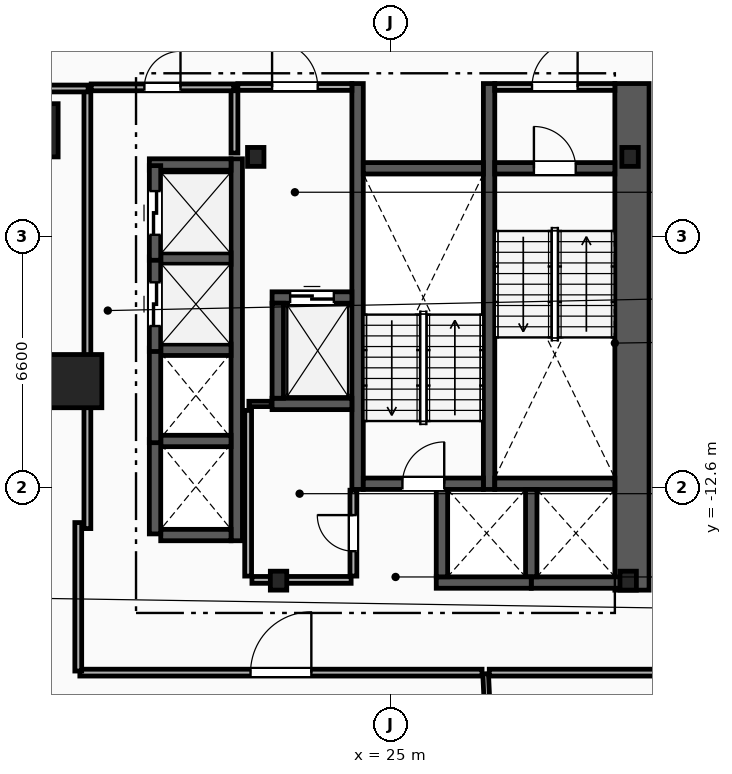
"""IFC4 building model, lengths in metres.
Left out: names, types, materials, properties, quantities, classifications, styles, units other than length and angle.
Written with IfcOpenShell. Run it as: python <this file> out.ifc"""

import sys

from ifc_helpers import new_model, si_unit, direction, frame, frame_2d, origin, origin_2d, place, context, subcontext, project, spatial, rectangle, i_section, extrude, element, fill, save


model = new_model("IFC4")
c1 = context("Model", 3, precision=1e-05, world=origin(), true_north=direction((0.0, 1.0)))
c2 = subcontext(c1, "Body", "Model", "MODEL_VIEW")
j1 = project(units=[si_unit("LENGTHUNIT", "METRE"), si_unit("PLANEANGLEUNIT", "RADIAN")], contexts=[c1])
p1 = place(None, origin())
s1 = spatial("IfcSite", under=j1, at=p1, CompositionType="ELEMENT")
p2 = place(p1, origin())
s2 = spatial("IfcBuilding", under=s1, at=p2, CompositionType="ELEMENT")
p3 = place(p2, frame((0.0, 0.0, 12.0)))
s3 = spatial("IfcBuildingStorey", under=s2, at=p3, CompositionType="ELEMENT", Elevation=12.0)
for number, where, z_axis, x_axis in (
    (1, (31.3, -3.9, 0.0), (0.0, 0.0, 1.0), (1.0, 0.0, 0.0)),
    (2, (21.45, -3.9, 0.0), (0.0, 0.0, 1.0), (1.0, 0.0, 0.0)),
    (3, (22.05, -15.05, 0.0), (0.0, 0.0, 1.0), (1.0, 0.0, 0.0)),
    (4, (31.25, -15.05, 0.0), (0.0, 0.0, 1.0), (1.0, 0.0, 0.0)),
):
    element("IfcColumn", number, at=place(p3, frame(where, z_axis=z_axis, x_axis=x_axis)), inside=s3, PredefinedType="COLUMN", context=c2, shape_type="SweptSolid", body=[
        extrude(i_section(OverallWidth=0.432, OverallDepth=0.498, WebThickness=0.056, FlangeThickness=0.089, FilletRadius=0.018, at=origin_2d()), origin(), (0.0, 0.0, 1.0), 4.0),
    ])
for number, where, z_axis, x_axis in (
    (5, (15.55, -3.2, 0.0), (0.0, 0.0, 1.0), (1.0, 0.0, 0.0)),
    (6, (16.7, -9.8, 0.0), (0.0, 0.0, 1.0), (1.0, 0.0, 0.0)),
):
    element("IfcColumn", number, at=place(p3, frame(where, z_axis=z_axis, x_axis=x_axis)), inside=s3, PredefinedType="COLUMN", context=c2, shape_type="SweptSolid", body=[
        extrude(rectangle(XDim=1.4, YDim=1.4, at=origin_2d()), origin(), (0.0, 0.0, 1.0), 4.0),
    ])
p4 = place(p3, frame((31.35, -15.3, 0.0), z_axis=(0.0, 0.0, 1.0), x_axis=(0.0, 1.0, 0.0)))
e7 = element("IfcWall", 7, at=p4, inside=s3, PredefinedType="SHEAR", context=c2, shape_type="SweptSolid", body=[
    extrude(rectangle(XDim=13.33, YDim=0.9, at=frame_2d((6.665, 0.0))), origin(), (0.0, 0.0, 1.0), 3.65),
])
for number, where, z_axis, x_axis in (
    (8, (27.59, -12.65, 0.0), (0.0, 0.0, 1.0), (0.0, 1.0, 0.0)),
    (9, (24.13, -12.65, 0.0), (0.0, 0.0, 1.0), (0.0, 1.0, 0.0)),
):
    element("IfcWall", number, at=place(p3, frame(where, z_axis=z_axis, x_axis=x_axis)), inside=s3, PredefinedType="SHEAR", context=c2, shape_type="SweptSolid", body=[
        extrude(rectangle(XDim=10.68, YDim=0.3, at=frame_2d((5.34, 0.0))), origin(), (0.0, 0.0, 1.0), 3.65),
    ])
p5 = place(p3, frame((27.74, -4.2, 0.0), z_axis=(0.0, 0.0, 1.0), x_axis=(1.0, 0.0, 0.0)))
e10 = element("IfcWall", 10, at=p5, inside=s3, PredefinedType="SHEAR", context=c2, shape_type="SweptSolid", body=[
    extrude(rectangle(XDim=3.16, YDim=0.3, at=frame_2d((1.58, 0.0))), origin(), (0.0, 0.0, 1.0), 3.65),
])
p6 = place(p5, frame((1.03, 0.0, 0.0)))
e11 = element("IfcOpeningElement", 11, at=p6, cuts=e10, PredefinedType="OPENING", context=c2, shape_type="SweptSolid", body=[
    extrude(rectangle(XDim=1.1, YDim=2.15, at=frame_2d((0.55, 1.075))), frame((0.0, 0.16, 0.0), z_axis=(0.0, -1.0, 0.0), x_axis=(1.0, 0.0, 0.0)), (0.0, 0.0, 1.0), 0.32),
])
p7 = place(p3, frame((27.74, -12.5, 0.0), z_axis=(0.0, 0.0, 1.0), x_axis=(1.0, 0.0, 0.0)))
e12 = element("IfcWall", 12, at=p7, inside=s3, PredefinedType="SHEAR", context=c2, shape_type="SweptSolid", body=[
    extrude(rectangle(XDim=3.16, YDim=0.3, at=frame_2d((1.58, 0.0))), origin(), (0.0, 0.0, 1.0), 3.65),
])
p8 = place(p3, frame((24.28, -12.5, 0.0), z_axis=(0.0, 0.0, 1.0), x_axis=(1.0, 0.0, 0.0)))
e13 = element("IfcWall", 13, at=p8, inside=s3, PredefinedType="SHEAR", context=c2, shape_type="SweptSolid", body=[
    extrude(rectangle(XDim=3.16, YDim=0.3, at=frame_2d((1.58, 0.0))), origin(), (0.0, 0.0, 1.0), 3.65),
])
p9 = place(p8, frame((1.03, 0.0, 0.0)))
e14 = element("IfcOpeningElement", 14, at=p9, cuts=e13, PredefinedType="OPENING", context=c2, shape_type="SweptSolid", body=[
    extrude(rectangle(XDim=1.1, YDim=2.15, at=frame_2d((0.55, 1.075))), frame((0.0, 0.16, 0.0), z_axis=(0.0, -1.0, 0.0), x_axis=(1.0, 0.0, 0.0)), (0.0, 0.0, 1.0), 0.32),
])
p10 = place(p3, frame((24.28, -4.2, 0.0), z_axis=(0.0, 0.0, 1.0), x_axis=(1.0, 0.0, 0.0)))
e15 = element("IfcWall", 15, at=p10, inside=s3, PredefinedType="SHEAR", context=c2, shape_type="SweptSolid", body=[
    extrude(rectangle(XDim=3.16, YDim=0.3, at=frame_2d((1.58, 0.0))), origin(), (0.0, 0.0, 1.0), 3.65),
])
p11 = place(p3, frame((20.89, -3.8, 0.0), z_axis=(0.0, 0.0, 1.0), x_axis=(0.0, 1.0, 0.0)))
e16 = element("IfcWall", 16, at=p11, inside=s3, PredefinedType="PARTITIONING", context=c2, shape_type="SweptSolid", body=[
    extrude(rectangle(XDim=1.65, YDim=0.18, at=frame_2d((0.825, 0.0))), origin(), (0.0, 0.0, 1.0), 3.65),
])
p12 = place(p3, frame((20.98, -2.06, 0.0), z_axis=(0.0, 0.0, 1.0), x_axis=(1.0, 0.0, 0.0)))
e17 = element("IfcWall", 17, at=p12, inside=s3, PredefinedType="PARTITIONING", context=c2, shape_type="SweptSolid", body=[
    extrude(rectangle(XDim=3.0, YDim=0.18, at=frame_2d((1.5, 0.0))), origin(), (0.0, 0.0, 1.0), 3.65),
])
p13 = place(p12, frame((0.9, 0.0, 0.0)))
e18 = element("IfcOpeningElement", 18, at=p13, cuts=e17, PredefinedType="OPENING", context=c2, shape_type="SweptSolid", body=[
    extrude(rectangle(XDim=1.2, YDim=2.15, at=frame_2d((0.6, 1.075))), frame((0.0, 0.1, 0.0), z_axis=(0.0, -1.0, 0.0), x_axis=(1.0, 0.0, 0.0)), (0.0, 0.0, 1.0), 0.2),
])
p14 = place(p3, frame((27.74, -2.06, 0.0), z_axis=(0.0, 0.0, 1.0), x_axis=(1.0, 0.0, 0.0)))
e19 = element("IfcWall", 19, at=p14, inside=s3, PredefinedType="PARTITIONING", context=c2, shape_type="SweptSolid", body=[
    extrude(rectangle(XDim=3.16, YDim=0.18, at=frame_2d((1.58, 0.0))), origin(), (0.0, 0.0, 1.0), 3.65),
])
p15 = place(p14, frame((0.98, 0.0, 0.0)))
e20 = element("IfcOpeningElement", 20, at=p15, cuts=e19, PredefinedType="OPENING", context=c2, shape_type="SweptSolid", body=[
    extrude(rectangle(XDim=1.2, YDim=2.15, at=frame_2d((0.6, 1.075))), frame((0.0, 0.1, 0.0), z_axis=(0.0, -1.0, 0.0), x_axis=(1.0, 0.0, 0.0)), (0.0, 0.0, 1.0), 0.2),
])
p16 = place(p3, frame((21.88, -7.6, 0.0), z_axis=(0.0, 0.0, 1.0), x_axis=(1.0, 0.0, 0.0)))
e21 = element("IfcWall", 21, at=p16, inside=s3, PredefinedType="SHEAR", context=c2, shape_type="SweptSolid", body=[
    extrude(rectangle(XDim=2.1, YDim=0.3, at=frame_2d((1.05, 0.0))), origin(), (0.0, 0.0, 1.0), 3.65),
])
p17 = place(p16, frame((0.475, 0.0, 0.0)))
e22 = element("IfcOpeningElement", 22, at=p17, cuts=e21, PredefinedType="OPENING", context=c2, shape_type="SweptSolid", body=[
    extrude(rectangle(XDim=1.15, YDim=2.2, at=frame_2d((0.575, 1.1))), frame((0.0, 0.16, 0.0), z_axis=(0.0, -1.0, 0.0), x_axis=(1.0, 0.0, 0.0)), (0.0, 0.0, 1.0), 0.32),
])
p18 = place(p3, frame((21.88, -10.4, 0.0), z_axis=(0.0, 0.0, 1.0), x_axis=(1.0, 0.0, 0.0)))
e23 = element("IfcWall", 23, at=p18, inside=s3, PredefinedType="SHEAR", context=c2, shape_type="SweptSolid", body=[
    extrude(rectangle(XDim=2.1, YDim=0.3, at=frame_2d((1.05, 0.0))), origin(), (0.0, 0.0, 1.0), 3.65),
])
for number, where, z_axis, x_axis in (
    (24, (22.03, -10.25, 0.0), (0.0, 0.0, 1.0), (0.0, 1.0, 0.0)),
    (25, (28.7, -15.1, 0.0), (0.0, 0.0, 1.0), (1.0, 0.0, 0.0)),
):
    element("IfcWall", number, at=place(p3, frame(where, z_axis=z_axis, x_axis=x_axis)), inside=s3, PredefinedType="SHEAR", context=c2, shape_type="SweptSolid", body=[
        extrude(rectangle(XDim=2.5, YDim=0.3, at=frame_2d((1.25, 0.0))), origin(), (0.0, 0.0, 1.0), 3.65),
    ])
p19 = place(p3, frame((28.7, -14.95, 0.0), z_axis=(0.0, 0.0, 1.0), x_axis=(0.0, 1.0, 0.0)))
e26 = element("IfcWall", 26, at=p19, inside=s3, PredefinedType="SHEAR", context=c2, shape_type="SweptSolid", body=[
    extrude(rectangle(XDim=2.3, YDim=0.3, at=frame_2d((1.15, 0.0))), origin(), (0.0, 0.0, 1.0), 3.65),
])
p20 = place(p3, frame((26.2, -15.1, 0.0), z_axis=(0.0, 0.0, 1.0), x_axis=(1.0, 0.0, 0.0)))
e27 = element("IfcWall", 27, at=p20, inside=s3, PredefinedType="SHEAR", context=c2, shape_type="SweptSolid", body=[
    extrude(rectangle(XDim=2.5, YDim=0.3, at=frame_2d((1.25, 0.0))), origin(), (0.0, 0.0, 1.0), 3.65),
])
p21 = place(p3, frame((26.35, -14.95, 0.0), z_axis=(0.0, 0.0, 1.0), x_axis=(0.0, 1.0, 0.0)))
e28 = element("IfcWall", 28, at=p21, inside=s3, PredefinedType="SHEAR", context=c2, shape_type="SweptSolid", body=[
    extrude(rectangle(XDim=2.3, YDim=0.3, at=frame_2d((1.15, 0.0))), origin(), (0.0, 0.0, 1.0), 3.65),
])
p22 = place(p3, frame((20.95, -14.0, 0.0), z_axis=(0.0, 0.0, 1.0), x_axis=(0.0, 1.0, 0.0)))
e29 = element("IfcWall", 29, at=p22, inside=s3, PredefinedType="SHEAR", context=c2, shape_type="SweptSolid", body=[
    extrude(rectangle(XDim=10.05, YDim=0.3, at=frame_2d((5.025, 0.0))), origin(), (0.0, 0.0, 1.0), 3.65),
])
p23 = place(p3, frame((18.95, -13.85, 0.0), z_axis=(0.0, 0.0, 1.0), x_axis=(1.0, 0.0, 0.0)))
e30 = element("IfcWall", 30, at=p23, inside=s3, PredefinedType="SHEAR", context=c2, shape_type="SweptSolid", body=[
    extrude(rectangle(XDim=1.85, YDim=0.3, at=frame_2d((0.925, 0.0))), origin(), (0.0, 0.0, 1.0), 3.65),
])
p24 = place(p3, frame((18.65, -4.1, 0.0), z_axis=(0.0, 0.0, 1.0), x_axis=(1.0, 0.0, 0.0)))
e31 = element("IfcWall", 31, at=p24, inside=s3, PredefinedType="SHEAR", context=c2, shape_type="SweptSolid", body=[
    extrude(rectangle(XDim=2.15, YDim=0.3, at=frame_2d((1.075, 0.0))), origin(), (0.0, 0.0, 1.0), 3.65),
])
for number, where, z_axis, x_axis in (
    (32, (18.95, -11.375, 0.0), (0.0, 0.0, 1.0), (1.0, 0.0, 0.0)),
    (33, (18.95, -8.975, 0.0), (0.0, 0.0, 1.0), (1.0, 0.0, 0.0)),
    (34, (18.95, -6.575, 0.0), (0.0, 0.0, 1.0), (1.0, 0.0, 0.0)),
):
    element("IfcWall", number, at=place(p3, frame(where, z_axis=z_axis, x_axis=x_axis)), inside=s3, PredefinedType="SHEAR", context=c2, shape_type="SweptSolid", body=[
        extrude(rectangle(XDim=1.85, YDim=0.3, at=frame_2d((0.925, 0.0))), origin(), (0.0, 0.0, 1.0), 3.65),
    ])
for number, where, z_axis, x_axis in (
    (35, (18.8, -13.82, 0.0), (0.0, 0.0, 1.0), (0.0, 1.0, 0.0)),
    (36, (18.8, -11.42, 0.0), (0.0, 0.0, 1.0), (0.0, 1.0, 0.0)),
):
    element("IfcWall", number, at=place(p3, frame(where, z_axis=z_axis, x_axis=x_axis)), inside=s3, PredefinedType="SHEAR", context=c2, shape_type="SweptSolid", body=[
        extrude(rectangle(XDim=2.49, YDim=0.3, at=frame_2d((1.245, 0.0))), origin(), (0.0, 0.0, 1.0), 3.65),
    ])
p25 = place(p3, frame((18.8, -9.02, 0.0), z_axis=(0.0, 0.0, 1.0), x_axis=(0.0, 1.0, 0.0)))
e37 = element("IfcWall", 37, at=p25, inside=s3, PredefinedType="SHEAR", context=c2, shape_type="SweptSolid", body=[
    extrude(rectangle(XDim=2.49, YDim=0.3, at=frame_2d((1.245, 0.0))), origin(), (0.0, 0.0, 1.0), 3.65),
])
p26 = place(p25, frame((0.67, 0.0, 0.0)))
e38 = element("IfcOpeningElement", 38, at=p26, cuts=e37, PredefinedType="OPENING", context=c2, shape_type="SweptSolid", body=[
    extrude(rectangle(XDim=1.15, YDim=2.2, at=frame_2d((0.575, 1.1))), frame((0.0, 0.16, 0.0), z_axis=(0.0, -1.0, 0.0), x_axis=(1.0, 0.0, 0.0)), (0.0, 0.0, 1.0), 0.32),
])
p27 = place(p3, frame((18.8, -6.62, 0.0), z_axis=(0.0, 0.0, 1.0), x_axis=(0.0, 1.0, 0.0)))
e39 = element("IfcWall", 39, at=p27, inside=s3, PredefinedType="SHEAR", context=c2, shape_type="SweptSolid", body=[
    extrude(rectangle(XDim=2.49, YDim=0.3, at=frame_2d((1.245, 0.0))), origin(), (0.0, 0.0, 1.0), 3.65),
])
p28 = place(p27, frame((0.67, 0.0, 0.0)))
e40 = element("IfcOpeningElement", 40, at=p28, cuts=e39, PredefinedType="OPENING", context=c2, shape_type="SweptSolid", body=[
    extrude(rectangle(XDim=1.15, YDim=2.2, at=frame_2d((0.575, 1.1))), frame((0.0, 0.16, 0.0), z_axis=(0.0, -1.0, 0.0), x_axis=(1.0, 0.0, 0.0)), (0.0, 0.0, 1.0), 0.32),
])
p29 = place(p3, frame((17.02, -13.68, 0.0), z_axis=(0.0, 0.0, 1.0), x_axis=(0.0, 1.0, 0.0)))
e41 = element("IfcWall", 41, at=p29, inside=s3, PredefinedType="PARTITIONING", context=c2, shape_type="SweptSolid", body=[
    extrude(rectangle(XDim=11.51, YDim=0.18, at=frame_2d((5.755, 0.0))), origin(), (0.0, 0.0, 1.0), 3.65),
])
p30 = place(p3, frame((17.12, -2.07, 0.0), z_axis=(0.0, 0.0, 1.0), x_axis=(1.0, 0.0, 0.0)))
e42 = element("IfcWall", 42, at=p30, inside=s3, PredefinedType="PARTITIONING", context=c2, shape_type="SweptSolid", body=[
    extrude(rectangle(XDim=3.75, YDim=0.18, at=frame_2d((1.875, 0.0))), origin(), (0.0, 0.0, 1.0), 3.65),
])
p31 = place(p30, frame((1.4, 0.0, 0.0)))
e43 = element("IfcOpeningElement", 43, at=p31, cuts=e42, PredefinedType="OPENING", context=c2, shape_type="SweptSolid", body=[
    extrude(rectangle(XDim=0.95, YDim=2.1, at=frame_2d((0.475, 1.05))), frame((0.0, 0.1, 0.0), z_axis=(0.0, -1.0, 0.0), x_axis=(1.0, 0.0, 0.0)), (0.0, 0.0, 1.0), 0.2),
])
p32 = place(p3, frame((21.27, -10.4, 0.0), z_axis=(0.0, 0.0, 1.0), x_axis=(1.0, 0.0, 0.0)))
e44 = element("IfcWall", 44, at=p32, inside=s3, PredefinedType="PARTITIONING", context=c2, shape_type="SweptSolid", body=[
    extrude(rectangle(XDim=0.59, YDim=0.14, at=frame_2d((0.295, 0.0))), origin(), (0.0, 0.0, 1.0), 3.65),
])
p33 = place(p3, frame((21.25, -14.93, 0.0), z_axis=(0.0, 0.0, 1.0), x_axis=(0.0, 1.0, 0.0)))
e45 = element("IfcWall", 45, at=p33, inside=s3, PredefinedType="PARTITIONING", context=c2, shape_type="SweptSolid", body=[
    extrude(rectangle(XDim=4.36, YDim=0.18, at=frame_2d((2.18, 0.0))), origin(), (0.0, 0.0, 1.0), 3.65),
])
p34 = place(p3, frame((21.35, -15.03, 0.0), z_axis=(0.0, 0.0, 1.0), x_axis=(1.0, 0.0, 0.0)))
e46 = element("IfcWall", 46, at=p34, inside=s3, PredefinedType="PARTITIONING", context=c2, shape_type="SweptSolid", body=[
    extrude(rectangle(XDim=2.61, YDim=0.18, at=frame_2d((1.305, 0.0))), origin(), (0.0, 0.0, 1.0), 2.723),
])
p35 = place(p3, frame((24.02, -14.93, 0.0), z_axis=(0.0, 0.0, 1.0), x_axis=(0.0, 1.0, 0.0)))
e47 = element("IfcWall", 47, at=p35, inside=s3, PredefinedType="PARTITIONING", context=c2, shape_type="SweptSolid", body=[
    extrude(rectangle(XDim=2.26, YDim=0.18, at=frame_2d((1.13, 0.0))), origin(), (0.0, 0.0, 1.0), 3.65),
])
p36 = place(p35, frame((0.655, 0.0, 0.0)))
e48 = element("IfcOpeningElement", 48, at=p36, cuts=e47, PredefinedType="OPENING", context=c2, shape_type="SweptSolid", body=[
    extrude(rectangle(XDim=0.95, YDim=2.1, at=frame_2d((0.475, 1.05))), frame((0.0, 0.1, 0.0), z_axis=(0.0, -1.0, 0.0), x_axis=(1.0, 0.0, 0.0)), (0.0, 0.0, 1.0), 0.2),
])
p37 = place(p3, frame((27.928, -26.694, 0.0), z_axis=(0.0, 0.0, 1.0), x_axis=(-0.046527880698, 0.998916991705, 0.0)))
e49 = element("IfcWall", 49, at=p37, inside=s3, PredefinedType="PARTITIONING", context=c2, shape_type="SweptSolid", body=[
    extrude(rectangle(XDim=9.204, YDim=0.15, at=frame_2d((4.602, 0.0))), origin(), (0.0, 0.0, 1.0), 3.65),
])
p38 = place(p37, frame((3.602, 0.0, 1.05)))
e50 = element("IfcOpeningElement", 50, at=p38, cuts=e49, PredefinedType="OPENING", context=c2, shape_type="SweptSolid", body=[
    extrude(rectangle(XDim=2.0, YDim=1.5, at=frame_2d((1.0, 0.75))), frame((0.0, 0.085, 0.0), z_axis=(0.0, -1.0, 0.0), x_axis=(1.0, 0.0, 0.0)), (0.0, 0.0, 1.0), 0.17),
])
p39 = place(p3, frame((16.822, -17.47, 0.0), z_axis=(0.0, 0.0, 1.0), x_axis=(1.0, 0.0, 0.0)))
e51 = element("IfcWall", 51, at=p39, inside=s3, PredefinedType="PARTITIONING", context=c2, shape_type="SweptSolid", body=[
    extrude(rectangle(XDim=10.583, YDim=0.18, at=frame_2d((5.292, 0.0))), origin(), (0.0, 0.0, 1.0), 3.65),
])
p40 = place(p39, frame((4.492, 0.0, 0.0)))
e52 = element("IfcOpeningElement", 52, at=p40, cuts=e51, PredefinedType="OPENING", context=c2, shape_type="SweptSolid", body=[
    extrude(rectangle(XDim=1.6, YDim=2.2, at=frame_2d((0.8, 1.1))), frame((0.0, 0.1, 0.0), z_axis=(0.0, -1.0, 0.0), x_axis=(1.0, 0.0, 0.0)), (0.0, 0.0, 1.0), 0.2),
])
p41 = place(p3, frame((9.595, -2.1, 0.0), z_axis=(0.0, 0.0, 1.0), x_axis=(1.0, 0.0, 0.0)))
e53 = element("IfcWall", 53, at=p41, inside=s3, PredefinedType="PARTITIONING", context=c2, shape_type="SweptSolid", body=[
    extrude(rectangle(XDim=7.445, YDim=0.18, at=frame_2d((3.723, 0.0))), origin(), (0.0, 0.0, 1.0), 2.877),
])
p42 = place(p41, frame((2.722, 0.0, 1.05)))
e54 = element("IfcOpeningElement", 54, at=p42, cuts=e53, PredefinedType="OPENING", context=c2, shape_type="SweptSolid", body=[
    extrude(rectangle(XDim=2.0, YDim=1.5, at=frame_2d((1.0, 0.75))), frame((0.0, 0.1, 0.0), z_axis=(0.0, -1.0, 0.0), x_axis=(1.0, 0.0, 0.0)), (0.0, 0.0, 1.0), 0.2),
])
p43 = place(p3, frame((16.78, -13.521, 0.0), z_axis=(0.0, 0.0, 1.0), x_axis=(0.0, -1.0, 0.0)))
e55 = element("IfcWall", 55, at=p43, inside=s3, PredefinedType="PARTITIONING", context=c2, shape_type="SweptSolid", body=[
    extrude(rectangle(XDim=3.907, YDim=0.18, at=frame_2d((1.954, 0.0))), origin(), (0.0, 0.0, 1.0), 3.65),
])
p44 = place(p3, frame((27.595, -17.47, 0.0), z_axis=(0.0, 0.0, 1.0), x_axis=(1.0, 0.0, 0.0)))
e56 = element("IfcWall", 56, at=p44, inside=s3, PredefinedType="PARTITIONING", context=c2, shape_type="SweptSolid", body=[
    extrude(rectangle(XDim=6.033, YDim=0.18, at=frame_2d((3.017, 0.0))), origin(), (0.0, 0.0, 1.0), 2.877),
])
p45 = place(p6, origin())
e57 = element("IfcDoor", 57, at=p45, inside=s3, OperationType="SINGLE_SWING_LEFT", PredefinedType="DOOR", context=c2, shape_type="SweptSolid", body=[
    extrude(rectangle(XDim=1.1, YDim=2.15, at=frame_2d((0.55, 1.075))), frame((0.0, 0.025, 0.0), z_axis=(0.0, -1.0, 0.0), x_axis=(1.0, 0.0, 0.0)), (0.0, 0.0, 1.0), 0.05),
])
fill(e11, e57)
p46 = place(p9, origin())
e58 = element("IfcDoor", 58, at=p46, inside=s3, OperationType="SINGLE_SWING_RIGHT", PredefinedType="DOOR", context=c2, shape_type="SweptSolid", body=[
    extrude(rectangle(XDim=1.1, YDim=2.15, at=frame_2d((0.55, 1.075))), frame((0.0, 0.025, 0.0), z_axis=(0.0, -1.0, 0.0), x_axis=(1.0, 0.0, 0.0)), (0.0, 0.0, 1.0), 0.05),
])
fill(e14, e58)
p47 = place(p13, origin())
e59 = element("IfcDoor", 59, at=p47, inside=s3, OperationType="SINGLE_SWING_LEFT", PredefinedType="DOOR", context=c2, shape_type="SweptSolid", body=[
    extrude(rectangle(XDim=1.2, YDim=2.15, at=frame_2d((0.6, 1.075))), frame((0.0, 0.025, 0.0), z_axis=(0.0, -1.0, 0.0), x_axis=(1.0, 0.0, 0.0)), (0.0, 0.0, 1.0), 0.05),
])
fill(e18, e59)
p48 = place(p15, origin())
e60 = element("IfcDoor", 60, at=p48, inside=s3, OperationType="SINGLE_SWING_RIGHT", PredefinedType="DOOR", context=c2, shape_type="SweptSolid", body=[
    extrude(rectangle(XDim=1.2, YDim=2.15, at=frame_2d((0.6, 1.075))), frame((0.0, 0.025, 0.0), z_axis=(0.0, -1.0, 0.0), x_axis=(1.0, 0.0, 0.0)), (0.0, 0.0, 1.0), 0.05),
])
fill(e20, e60)
p49 = place(p17, origin())
e61 = element("IfcDoor", 61, at=p49, inside=s3, OperationType="SLIDING_TO_LEFT", PredefinedType="TRAPDOOR", context=c2, shape_type="SweptSolid", body=[
    extrude(rectangle(XDim=1.15, YDim=2.2, at=frame_2d((0.575, 1.1))), frame((0.0, 0.025, 0.0), z_axis=(0.0, -1.0, 0.0), x_axis=(1.0, 0.0, 0.0)), (0.0, 0.0, 1.0), 0.05),
])
fill(e22, e61)
p50 = place(p26, origin())
e62 = element("IfcDoor", 62, at=p50, inside=s3, OperationType="SLIDING_TO_LEFT", PredefinedType="TRAPDOOR", context=c2, shape_type="SweptSolid", body=[
    extrude(rectangle(XDim=1.15, YDim=2.2, at=frame_2d((0.575, 1.1))), frame((0.0, 0.025, 0.0), z_axis=(0.0, -1.0, 0.0), x_axis=(1.0, 0.0, 0.0)), (0.0, 0.0, 1.0), 0.05),
])
fill(e38, e62)
p51 = place(p28, origin())
e63 = element("IfcDoor", 63, at=p51, inside=s3, OperationType="SLIDING_TO_LEFT", PredefinedType="TRAPDOOR", context=c2, shape_type="SweptSolid", body=[
    extrude(rectangle(XDim=1.15, YDim=2.2, at=frame_2d((0.575, 1.1))), frame((0.0, 0.025, 0.0), z_axis=(0.0, -1.0, 0.0), x_axis=(1.0, 0.0, 0.0)), (0.0, 0.0, 1.0), 0.05),
])
fill(e40, e63)
p52 = place(p40, origin())
e64 = element("IfcDoor", 64, at=p52, inside=s3, OperationType="SINGLE_SWING_RIGHT", PredefinedType="DOOR", context=c2, shape_type="SweptSolid", body=[
    extrude(rectangle(XDim=1.6, YDim=2.2, at=frame_2d((0.8, 1.1))), frame((0.0, 0.025, 0.0), z_axis=(0.0, -1.0, 0.0), x_axis=(1.0, 0.0, 0.0)), (0.0, 0.0, 1.0), 0.05),
])
fill(e52, e64)
p53 = place(p31, origin())
e65 = element("IfcDoor", 65, at=p53, inside=s3, OperationType="SINGLE_SWING_RIGHT", PredefinedType="DOOR", context=c2, shape_type="SweptSolid", body=[
    extrude(rectangle(XDim=0.95, YDim=2.1, at=frame_2d((0.475, 1.05))), frame((0.0, 0.025, 0.0), z_axis=(0.0, -1.0, 0.0), x_axis=(1.0, 0.0, 0.0)), (0.0, 0.0, 1.0), 0.05),
])
fill(e43, e65)
p54 = place(p36, origin())
e66 = element("IfcDoor", 66, at=p54, inside=s3, OperationType="SINGLE_SWING_RIGHT", PredefinedType="DOOR", context=c2, shape_type="SweptSolid", body=[
    extrude(rectangle(XDim=0.95, YDim=2.1, at=frame_2d((0.475, 1.05))), frame((0.0, 0.025, 0.0), z_axis=(0.0, -1.0, 0.0), x_axis=(1.0, 0.0, 0.0)), (0.0, 0.0, 1.0), 0.05),
])
fill(e48, e66)
save(model, sys.argv[1])
